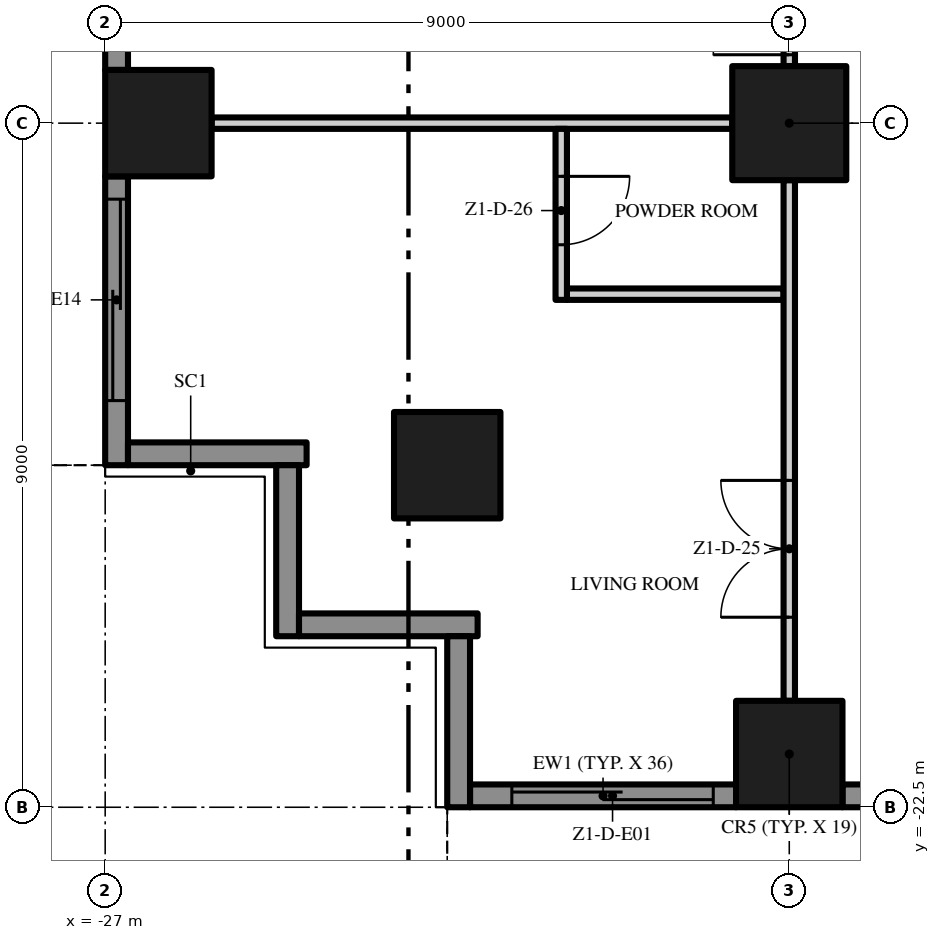
"""IFC4 building model, lengths in metres.
Left out: names, types, materials, properties, quantities, classifications, styles, units other than length and angle.
Written with IfcOpenShell. Run it as: python <this file> out.ifc"""

import sys

from ifc_helpers import new_model, si_unit, direction, frame, frame_2d, origin, origin_2d, place, context, subcontext, project, spatial, polyline, rectangle, outline, extrude, element, fill, save


model = new_model("IFC4")
c1 = context("Model", 3, precision=1e-05, world=origin(), true_north=direction((0.0, 1.0)))
c2 = subcontext(c1, "Body", "Model", "MODEL_VIEW")
j1 = project(units=[si_unit("LENGTHUNIT", "METRE"), si_unit("PLANEANGLEUNIT", "RADIAN")], contexts=[c1])
p1 = place(None, origin())
s1 = spatial("IfcSite", under=j1, at=p1, CompositionType="ELEMENT")
p2 = place(p1, origin())
s2 = spatial("IfcBuilding", under=s1, at=p2, CompositionType="ELEMENT")
p3 = place(p2, frame((0.0, 0.0, 49.2)))
s3 = spatial("IfcBuildingStorey", under=s2, at=p3, CompositionType="ELEMENT", Elevation=49.2)
p4 = place(p3, frame((-18.0, -13.5, 0.0), z_axis=(0.0, 0.0, 1.0), x_axis=(1.0, 0.0, 0.0)))
e1 = element("IfcColumn", 1, at=p4, inside=s3, PredefinedType="COLUMN", context=c2, shape_type="SweptSolid", body=[
    extrude(rectangle(XDim=1.5, YDim=1.5, at=origin_2d()), origin(), (0.0, 0.0, 1.0), 3.5),
])
for number, where, z_axis, x_axis in (
    (2, (-18.0, -21.8, 0.0), (0.0, 0.0, 1.0), (1.0, 0.0, 0.0)),
    (3, (-26.3, -13.5, 0.0), (0.0, 0.0, 1.0), (1.0, 0.0, 0.0)),
    (4, (-22.5, -18.0, 0.0), (0.0, 0.0, 1.0), (1.0, 0.0, 0.0)),
):
    element("IfcColumn", number, at=place(p3, frame(where, z_axis=z_axis, x_axis=x_axis)), inside=s3, PredefinedType="COLUMN", context=c2, shape_type="SweptSolid", body=[
        extrude(rectangle(XDim=1.4, YDim=1.4, at=origin_2d()), origin(), (0.0, 0.0, 1.0), 3.5),
    ])
p5 = place(p3, frame((-18.7, -22.35, 0.0), z_axis=(0.0, 0.0, 1.0), x_axis=(-1.0, 0.0, 0.0)))
e5 = element("IfcWall", 5, at=p5, inside=s3, PredefinedType="SOLIDWALL", context=c2, shape_type="SweptSolid", body=[
    extrude(rectangle(XDim=3.5, YDim=0.3, at=frame_2d((1.75, 0.0))), origin(), (0.0, 0.0, 1.0), 3.5),
])
p6 = place(p5, frame((0.3, 0.0, 0.0)))
e6 = element("IfcOpeningElement", 6, at=p6, cuts=e5, PredefinedType="OPENING", context=c2, shape_type="SweptSolid", body=[
    extrude(rectangle(XDim=2.65, YDim=2.4, at=frame_2d((1.325, 1.2))), frame((0.0, 0.16, 0.0), z_axis=(0.0, -1.0, 0.0), x_axis=(1.0, 0.0, 0.0)), (0.0, 0.0, 1.0), 0.32),
])
p7 = place(p3, frame((-9.7, -22.35, 0.0), z_axis=(0.0, 0.0, 1.0), x_axis=(-1.0, 0.0, 0.0)))
e7 = element("IfcWall", 7, at=p7, inside=s3, PredefinedType="SOLIDWALL", context=c2, shape_type="SweptSolid", body=[
    extrude(rectangle(XDim=7.6, YDim=0.3, at=frame_2d((3.8, 0.0))), origin(), (0.0, 0.0, 1.0), 3.5),
])
p8 = place(p7, frame((4.65, 0.0, 0.45)))
e8 = element("IfcOpeningElement", 8, at=p8, cuts=e7, PredefinedType="OPENING", context=c2, shape_type="SweptSolid", body=[
    extrude(rectangle(XDim=2.65, YDim=2.65, at=frame_2d((1.325, 1.325))), frame((0.0, 0.16, 0.0), z_axis=(0.0, -1.0, 0.0), x_axis=(1.0, 0.0, 0.0)), (0.0, 0.0, 1.0), 0.32),
])
p9 = place(p7, frame((0.3, 0.0, 0.45)))
e9 = element("IfcOpeningElement", 9, at=p9, cuts=e7, PredefinedType="OPENING", context=c2, shape_type="SweptSolid", body=[
    extrude(rectangle(XDim=2.65, YDim=2.65, at=frame_2d((1.325, 1.325))), frame((0.0, 0.16, 0.0), z_axis=(0.0, -1.0, 0.0), x_axis=(1.0, 0.0, 0.0)), (0.0, 0.0, 1.0), 0.32),
])
p10 = place(p3, frame((-26.85, -12.8, 0.0), z_axis=(0.0, 0.0, 1.0), x_axis=(0.0, 1.0, 0.0)))
e10 = element("IfcWall", 10, at=p10, inside=s3, PredefinedType="SOLIDWALL", context=c2, shape_type="SweptSolid", body=[
    extrude(rectangle(XDim=7.6, YDim=0.3, at=frame_2d((3.8, 0.0))), origin(), (0.0, 0.0, 1.0), 3.5),
])
p11 = place(p10, frame((4.65, 0.0, 0.45)))
e11 = element("IfcOpeningElement", 11, at=p11, cuts=e10, PredefinedType="OPENING", context=c2, shape_type="SweptSolid", body=[
    extrude(rectangle(XDim=2.65, YDim=2.65, at=frame_2d((1.325, 1.325))), frame((0.0, 0.16, 0.0), z_axis=(0.0, -1.0, 0.0), x_axis=(1.0, 0.0, 0.0)), (0.0, 0.0, 1.0), 0.32),
])
p12 = place(p10, frame((0.3, 0.0, 0.0)))
e12 = element("IfcOpeningElement", 12, at=p12, cuts=e10, PredefinedType="OPENING", context=c2, shape_type="SweptSolid", body=[
    extrude(rectangle(XDim=2.65, YDim=2.4, at=frame_2d((1.325, 1.2))), frame((0.0, 0.16, 0.0), z_axis=(0.0, -1.0, 0.0), x_axis=(1.0, 0.0, 0.0)), (0.0, 0.0, 1.0), 0.32),
])
p13 = place(p3, frame((-26.85, -18.0, 0.0), z_axis=(0.0, 0.0, 1.0), x_axis=(0.0, 1.0, 0.0)))
e13 = element("IfcWall", 13, at=p13, inside=s3, PredefinedType="SOLIDWALL", context=c2, shape_type="SweptSolid", body=[
    extrude(rectangle(XDim=3.8, YDim=0.3, at=frame_2d((1.9, 0.0))), origin(), (0.0, 0.0, 1.0), 3.5),
])
p14 = place(p13, frame((0.85, 0.0, 0.0)))
e14 = element("IfcOpeningElement", 14, at=p14, cuts=e13, PredefinedType="OPENING", context=c2, shape_type="SweptSolid", body=[
    extrude(rectangle(XDim=2.65, YDim=2.4, at=frame_2d((1.325, 1.2))), frame((0.0, 0.16, 0.0), z_axis=(0.0, -1.0, 0.0), x_axis=(1.0, 0.0, 0.0)), (0.0, 0.0, 1.0), 0.32),
])
p15 = place(p3, frame((-24.35, -17.85, 0.0), z_axis=(0.0, 0.0, 1.0), x_axis=(-1.0, 0.0, 0.0)))
e15 = element("IfcWall", 15, at=p15, inside=s3, PredefinedType="SOLIDWALL", context=c2, shape_type="SweptSolid", body=[
    extrude(rectangle(XDim=2.35, YDim=0.3, at=frame_2d((1.175, 0.0))), origin(), (0.0, 0.0, 1.0), 3.5),
])
p16 = place(p3, frame((-24.6, -20.25, 0.0), z_axis=(0.0, 0.0, 1.0), x_axis=(0.0, 1.0, 0.0)))
e16 = element("IfcWall", 16, at=p16, inside=s3, PredefinedType="SOLIDWALL", context=c2, shape_type="SweptSolid", body=[
    extrude(rectangle(XDim=2.25, YDim=0.3, at=frame_2d((1.125, 0.0))), origin(), (0.0, 0.0, 1.0), 3.5),
])
p17 = place(p3, frame((-22.1, -20.1, 0.0), z_axis=(0.0, 0.0, 1.0), x_axis=(-1.0, 0.0, 0.0)))
e17 = element("IfcWall", 17, at=p17, inside=s3, PredefinedType="SOLIDWALL", context=c2, shape_type="SweptSolid", body=[
    extrude(rectangle(XDim=2.35, YDim=0.3, at=frame_2d((1.175, 0.0))), origin(), (0.0, 0.0, 1.0), 3.5),
])
p18 = place(p3, frame((-22.35, -22.5, 0.0), z_axis=(0.0, 0.0, 1.0), x_axis=(0.0, 1.0, 0.0)))
e18 = element("IfcWall", 18, at=p18, inside=s3, PredefinedType="SOLIDWALL", context=c2, shape_type="SweptSolid", body=[
    extrude(rectangle(XDim=2.25, YDim=0.3, at=frame_2d((1.125, 0.0))), origin(), (0.0, 0.0, 1.0), 3.5),
])
p19 = place(p3, origin())
e19 = element("IfcWall", 19, at=p19, inside=s3, PredefinedType="USERDEFINED", context=c2, shape_type="SweptSolid", body=[
    extrude(outline(polyline([(-22.5, -25.149), (-21.0, -25.485), (-20.625, -25.5), (-19.5, -25.369), (-18.0, -24.845), (-16.5, -24.112), (-15.0, -23.451), (-13.5, -23.115), (-13.125, -23.1), (-12.0, -23.231), (-10.5, -23.755), (-9.0, -24.488), (-7.5, -25.149), (-6.0, -25.485), (-5.625, -25.5), (-4.5, -25.369), (-3.0, -24.845), (-1.5, -24.112), (0.0, -23.451), (1.5, -23.115), (1.875, -23.1), (3.0, -23.231), (4.5, -23.755), (6.0, -24.488), (7.5, -25.149), (9.0, -25.485), (9.375, -25.5), (10.5, -25.369), (12.0, -24.845), (13.5, -24.112), (15.0, -23.451), (16.5, -23.115), (16.875, -23.1), (18.0, -23.231), (19.5, -23.755), (21.0, -24.488), (22.5, -25.149), (22.601, -24.92), (21.105, -24.261), (19.596, -23.524), (18.056, -22.986), (16.885, -22.849), (16.467, -22.866), (14.921, -23.213), (13.395, -23.885), (11.904, -24.614), (10.444, -25.124), (9.365, -25.249), (9.033, -25.236), (7.579, -24.91), (6.105, -24.261), (4.596, -23.524), (3.056, -22.986), (1.885, -22.849), (1.467, -22.866), (-0.079, -23.213), (-1.605, -23.885), (-3.096, -24.614), (-4.556, -25.124), (-5.635, -25.249), (-5.967, -25.236), (-7.421, -24.91), (-8.895, -24.261), (-10.404, -23.524), (-11.944, -22.986), (-13.115, -22.849), (-13.533, -22.866), (-15.079, -23.213), (-16.605, -23.885), (-18.096, -24.614), (-19.556, -25.124), (-20.635, -25.249), (-20.967, -25.236), (-22.445, -24.905), (-22.5, -25.149)])), origin(), (0.0, 0.0, 1.0), 0.9),
])
p20 = place(p3, origin())
e20 = element("IfcWall", 20, at=p20, inside=s3, PredefinedType="USERDEFINED", context=c2, shape_type="SweptSolid", body=[
    extrude(outline(polyline([(-29.649, 18.0), (-29.985, 16.5), (-30.0, 16.125), (-29.869, 15.0), (-29.345, 13.5), (-28.612, 12.0), (-27.951, 10.5), (-27.615, 9.0), (-27.6, 8.625), (-27.731, 7.5), (-28.255, 6.0), (-28.988, 4.5), (-29.649, 3.0), (-29.985, 1.5), (-30.0, 1.125), (-29.869, 0.0), (-29.345, -1.5), (-28.612, -3.0), (-27.951, -4.5), (-27.615, -6.0), (-27.6, -6.375), (-27.731, -7.5), (-28.255, -9.0), (-28.988, -10.5), (-29.649, -12.0), (-29.985, -13.5), (-30.0, -13.875), (-29.869, -15.0), (-29.345, -16.5), (-28.612, -18.0), (-28.388, -17.89), (-29.114, -16.404), (-29.624, -14.944), (-29.749, -13.865), (-29.736, -13.533), (-29.41, -12.079), (-28.761, -10.605), (-28.024, -9.096), (-27.486, -7.556), (-27.349, -6.385), (-27.366, -5.967), (-27.713, -4.421), (-28.385, -2.895), (-29.114, -1.404), (-29.624, 0.056), (-29.749, 1.135), (-29.736, 1.467), (-29.41, 2.921), (-28.761, 4.395), (-28.024, 5.904), (-27.486, 7.444), (-27.349, 8.615), (-27.366, 9.033), (-27.713, 10.579), (-28.385, 12.105), (-29.114, 13.596), (-29.624, 15.056), (-29.749, 16.135), (-29.736, 16.467), (-29.405, 17.945), (-29.649, 18.0)])), origin(), (0.0, 0.0, 1.0), 0.9),
])
p21 = place(p3, frame((-20.925, -15.75, 0.0), z_axis=(0.0, 0.0, 1.0), x_axis=(1.0, 0.0, 0.0)))
e21 = element("IfcWall", 21, at=p21, inside=s3, PredefinedType="PARTITIONING", context=c2, shape_type="SweptSolid", body=[
    extrude(rectangle(XDim=2.85, YDim=0.15, at=frame_2d((1.425, 0.0))), origin(), (0.0, 0.0, 1.0), 3.5),
])
p22 = place(p3, frame((-25.6, -13.5, 0.0), z_axis=(0.0, 0.0, 1.0), x_axis=(1.0, 0.0, 0.0)))
e22 = element("IfcWall", 22, at=p22, inside=s3, PredefinedType="PARTITIONING", context=c2, shape_type="SweptSolid", body=[
    extrude(rectangle(XDim=6.85, YDim=0.15, at=frame_2d((3.425, 0.0))), origin(), (0.0, 0.0, 1.0), 3.5),
])
p23 = place(p3, frame((-21.0, -13.575, 0.0), z_axis=(0.0, 0.0, 1.0), x_axis=(0.0, -1.0, 0.0)))
e23 = element("IfcWall", 23, at=p23, inside=s3, PredefinedType="PARTITIONING", context=c2, shape_type="SweptSolid", body=[
    extrude(rectangle(XDim=2.25, YDim=0.15, at=frame_2d((1.125, 0.0))), origin(), (0.0, 0.0, 1.0), 3.5),
])
p24 = place(p23, frame((0.625, 0.0, 0.0)))
e24 = element("IfcOpeningElement", 24, at=p24, cuts=e23, PredefinedType="OPENING", context=c2, shape_type="SweptSolid", body=[
    extrude(rectangle(XDim=0.9, YDim=2.1, at=frame_2d((0.45, 1.05))), frame((0.0, 0.085, 0.0), z_axis=(0.0, -1.0, 0.0), x_axis=(1.0, 0.0, 0.0)), (0.0, 0.0, 1.0), 0.17),
])
p25 = place(p3, frame((-18.0, -21.1, 0.0), z_axis=(0.0, 0.0, 1.0), x_axis=(0.0, 1.0, 0.0)))
e25 = element("IfcWall", 25, at=p25, inside=s3, PredefinedType="PARTITIONING", context=c2, shape_type="SweptSolid", body=[
    extrude(rectangle(XDim=6.85, YDim=0.15, at=frame_2d((3.425, 0.0))), origin(), (0.0, 0.0, 1.0), 3.5),
])
p26 = place(p25, frame((1.1, 0.0, 0.0)))
e26 = element("IfcOpeningElement", 26, at=p26, cuts=e25, PredefinedType="OPENING", context=c2, shape_type="SweptSolid", body=[
    extrude(rectangle(XDim=1.8, YDim=2.4, at=frame_2d((0.9, 1.2))), frame((0.0, 0.085, 0.0), z_axis=(0.0, -1.0, 0.0), x_axis=(1.0, 0.0, 0.0)), (0.0, 0.0, 1.0), 0.17),
])
p27 = place(p3, frame((-18.0, -12.75, 0.0), z_axis=(0.0, 0.0, 1.0), x_axis=(0.0, 1.0, 0.0)))
e27 = element("IfcWall", 27, at=p27, inside=s3, PredefinedType="PARTITIONING", context=c2, shape_type="SweptSolid", body=[
    extrude(rectangle(XDim=7.5, YDim=0.15, at=frame_2d((3.75, 0.0))), origin(), (0.0, 0.0, 1.0), 3.5),
])
p28 = place(p27, frame((6.35, 0.0, 0.0)))
e28 = element("IfcOpeningElement", 28, at=p28, cuts=e27, PredefinedType="OPENING", context=c2, shape_type="SweptSolid", body=[
    extrude(rectangle(XDim=1.0, YDim=2.4, at=frame_2d((0.5, 1.2))), frame((0.0, 0.085, 0.0), z_axis=(0.0, -1.0, 0.0), x_axis=(1.0, 0.0, 0.0)), (0.0, 0.0, 1.0), 0.17),
])
p29 = place(p27, frame((0.15, 0.0, 0.0)))
e29 = element("IfcOpeningElement", 29, at=p29, cuts=e27, PredefinedType="OPENING", context=c2, shape_type="SweptSolid", body=[
    extrude(rectangle(XDim=1.0, YDim=2.4, at=frame_2d((0.5, 1.2))), frame((0.0, 0.085, 0.0), z_axis=(0.0, -1.0, 0.0), x_axis=(1.0, 0.0, 0.0)), (0.0, 0.0, 1.0), 0.17),
])
p30 = place(p6, origin())
e30 = element("IfcDoor", 30, at=p30, inside=s3, OperationType="SINGLE_SWING_LEFT", PredefinedType="DOOR", context=c2, shape_type="SweptSolid", body=[
    extrude(rectangle(XDim=2.65, YDim=2.4, at=frame_2d((1.325, 1.2))), frame((0.0, 0.025, 0.0), z_axis=(0.0, -1.0, 0.0), x_axis=(1.0, 0.0, 0.0)), (0.0, 0.0, 1.0), 0.05),
])
fill(e6, e30)
p31 = place(p14, origin())
e31 = element("IfcDoor", 31, at=p31, inside=s3, OperationType="SINGLE_SWING_LEFT", PredefinedType="DOOR", context=c2, shape_type="SweptSolid", body=[
    extrude(rectangle(XDim=2.65, YDim=2.4, at=frame_2d((1.325, 1.2))), frame((0.0, 0.025, 0.0), z_axis=(0.0, -1.0, 0.0), x_axis=(1.0, 0.0, 0.0)), (0.0, 0.0, 1.0), 0.05),
])
fill(e14, e31)
p32 = place(p29, origin())
e32 = element("IfcDoor", 32, at=p32, inside=s3, OperationType="SINGLE_SWING_LEFT", PredefinedType="DOOR", context=c2, shape_type="SweptSolid", body=[
    extrude(rectangle(XDim=1.0, YDim=2.4, at=frame_2d((0.5, 1.2))), frame((0.0, 0.025, 0.0), z_axis=(0.0, -1.0, 0.0), x_axis=(1.0, 0.0, 0.0)), (0.0, 0.0, 1.0), 0.05),
])
fill(e29, e32)
p33 = place(p26, origin())
e33 = element("IfcDoor", 33, at=p33, inside=s3, OperationType="DOUBLE_DOOR_SINGLE_SWING", PredefinedType="DOOR", context=c2, shape_type="SweptSolid", body=[
    extrude(rectangle(XDim=1.8, YDim=2.4, at=frame_2d((0.9, 1.2))), frame((0.0, 0.025, 0.0), z_axis=(0.0, -1.0, 0.0), x_axis=(1.0, 0.0, 0.0)), (0.0, 0.0, 1.0), 0.05),
])
fill(e26, e33)
p34 = place(p24, origin())
e34 = element("IfcDoor", 34, at=p34, inside=s3, OperationType="SINGLE_SWING_LEFT", PredefinedType="DOOR", context=c2, shape_type="SweptSolid", body=[
    extrude(rectangle(XDim=0.9, YDim=2.1, at=frame_2d((0.45, 1.05))), frame((0.0, 0.025, 0.0), z_axis=(0.0, -1.0, 0.0), x_axis=(1.0, 0.0, 0.0)), (0.0, 0.0, 1.0), 0.05),
])
fill(e24, e34)
save(model, sys.argv[1])
